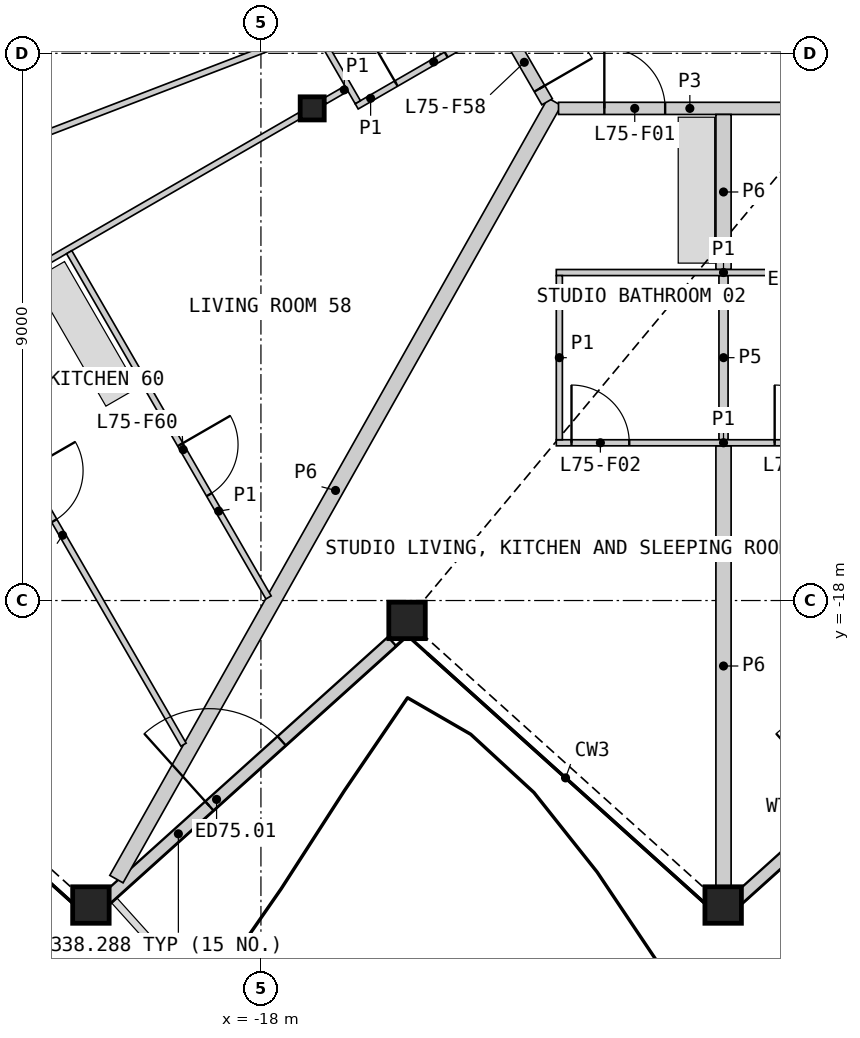
"""IFC4 building model, lengths in metres.
Left out: names, types, materials, properties, quantities, classifications, styles, units other than length and angle.
Written with IfcOpenShell. Run it as: python <this file> out.ifc"""

import sys

from ifc_helpers import new_model, si_unit, direction, frame, frame_2d, origin, origin_2d, place, context, subcontext, project, spatial, rectangle, hollow_rectangle, i_section, extrude, element, fill, save


model = new_model("IFC4")
c1 = context("Model", 3, precision=1e-05, world=origin(), true_north=direction((0.0, 1.0)))
c2 = subcontext(c1, "Body", "Model", "MODEL_VIEW")
j1 = project(units=[si_unit("LENGTHUNIT", "METRE"), si_unit("PLANEANGLEUNIT", "RADIAN")], contexts=[c1])
p1 = place(None, origin())
s1 = spatial("IfcSite", under=j1, at=p1, CompositionType="ELEMENT")
p2 = place(p1, origin())
s2 = spatial("IfcBuilding", under=s1, at=p2, CompositionType="ELEMENT")
p3 = place(p2, frame((0.0, 0.0, 335.8)))
s3 = spatial("IfcBuildingStorey", under=s2, at=p3, CompositionType="ELEMENT", Elevation=335.8)
for number, where, z_axis, x_axis in (
    (1, (-20.796, -23.008, 0.0), (0.0, 0.0, 1.0), (1.0, 0.0, 0.0)),
    (2, (-15.597, -18.327, 0.0), (0.0, 0.0, 1.0), (1.0, 0.0, 0.0)),
    (3, (-10.398, -23.008, 0.0), (0.0, 0.0, 1.0), (1.0, 0.0, 0.0)),
):
    element("IfcColumn", number, at=place(p3, frame(where, z_axis=z_axis, x_axis=x_axis)), inside=s3, PredefinedType="COLUMN", context=c2, shape_type="SweptSolid", body=[
        extrude(hollow_rectangle(XDim=0.6, YDim=0.6, WallThickness=0.04, at=origin_2d()), origin(), (0.0, 0.0, 1.0), 3.4),
    ])
p4 = place(p3, frame((-17.157, -9.906, 0.0), z_axis=(0.0, 0.0, 1.0), x_axis=(1.0, 0.0, 0.0)))
e4 = element("IfcColumn", 4, at=p4, inside=s3, PredefinedType="COLUMN", context=c2, shape_type="SweptSolid", body=[
    extrude(i_section(OverallWidth=0.396, OverallDepth=0.381, WebThickness=0.019, FlangeThickness=0.03, at=origin_2d()), origin(), (0.0, 0.0, 1.0), 3.4),
])
p5 = place(p3, frame((-20.53, -22.892, 0.0), z_axis=(0.0, 0.0, 1.0), x_axis=(0.743134328827, 0.669142263887, 0.0)))
e5 = element("IfcWall", 5, at=p5, inside=s3, PredefinedType="SOLIDWALL", context=c2, shape_type="SweptSolid", body=[
    extrude(rectangle(XDim=6.305, YDim=0.2, at=frame_2d((3.153, 0.0))), origin(), (0.0, 0.0, 1.0), 2.488),
])
p6 = place(p5, frame((2.262, 0.0, 0.0)))
e6 = element("IfcOpeningElement", 6, at=p6, cuts=e5, PredefinedType="OPENING", context=c2, shape_type="SweptSolid", body=[
    extrude(rectangle(XDim=1.6, YDim=2.25, at=frame_2d((0.8, 1.125))), frame((0.0, 0.11, 0.0), z_axis=(0.0, -1.0, 0.0), x_axis=(1.0, 0.0, 0.0)), (0.0, 0.0, 1.0), 0.22),
])
p7 = place(p3, frame((-10.137, -22.892, 0.0), z_axis=(0.0, 0.0, 1.0), x_axis=(0.743147981531, 0.669127101189, 0.0)))
e7 = element("IfcWall", 7, at=p7, inside=s3, PredefinedType="SOLIDWALL", context=c2, shape_type="SweptSolid", body=[
    extrude(rectangle(XDim=6.313, YDim=0.2, at=frame_2d((3.156, 0.0))), origin(), (0.0, 0.0, 1.0), 2.488),
])
p8 = place(p7, frame((2.262, 0.0, 0.0)))
e8 = element("IfcOpeningElement", 8, at=p8, cuts=e7, PredefinedType="OPENING", context=c2, shape_type="SweptSolid", body=[
    extrude(rectangle(XDim=1.6, YDim=2.25, at=frame_2d((0.8, 1.125))), frame((0.0, 0.11, 0.0), z_axis=(0.0, -1.0, 0.0), x_axis=(1.0, 0.0, 0.0)), (0.0, 0.0, 1.0), 0.22),
])
p9 = place(p3, frame((-20.376, -22.582, 0.0), z_axis=(0.0, 0.0, 1.0), x_axis=(0.491057132664, 0.871127368678, 0.0)))
e9 = element("IfcWall", 9, at=p9, inside=s3, PredefinedType="PARTITIONING", context=c2, shape_type="SweptSolid", body=[
    extrude(rectangle(XDim=14.677, YDim=0.25, at=frame_2d((7.338, 0.0))), origin(), (0.0, 0.0, 1.0), 2.33),
])
p10 = place(p3, frame((-10.393, -22.698, 0.0), z_axis=(0.0, 0.0, 1.0), x_axis=(0.0, 1.0, 0.0)))
e10 = element("IfcWall", 10, at=p10, inside=s3, PredefinedType="PARTITIONING", context=c2, shape_type="SweptSolid", body=[
    extrude(rectangle(XDim=7.242, YDim=0.25, at=frame_2d((3.621, 0.0))), origin(), (0.0, 0.0, 1.0), 2.33),
])
p11 = place(p3, frame((-13.106, -9.906, 0.0), z_axis=(0.0, 0.0, 1.0), x_axis=(1.0, 0.0, 0.0)))
e11 = element("IfcWall", 11, at=p11, inside=s3, PredefinedType="PARTITIONING", context=c2, shape_type="SweptSolid", body=[
    extrude(rectangle(XDim=4.32, YDim=0.2, at=frame_2d((2.16, 0.0))), origin(), (0.0, 0.0, 1.0), 3.1),
])
p12 = place(p11, frame((0.753, 0.0, 0.0)))
e12 = element("IfcOpeningElement", 12, at=p12, cuts=e11, PredefinedType="OPENING", context=c2, shape_type="SweptSolid", body=[
    extrude(rectangle(XDim=1.0, YDim=2.1, at=frame_2d((0.5, 1.05))), frame((0.0, 0.11, 0.0), z_axis=(0.0, -1.0, 0.0), x_axis=(1.0, 0.0, 0.0)), (0.0, 0.0, 1.0), 0.22),
])
p13 = place(p3, frame((-15.131, -6.614, 0.0), z_axis=(0.0, 0.0, 1.0), x_axis=(0.499967746641, -0.866044024469, 0.0)))
e13 = element("IfcWall", 13, at=p13, inside=s3, PredefinedType="PARTITIONING", context=c2, shape_type="SweptSolid", body=[
    extrude(rectangle(XDim=3.676, YDim=0.2, at=frame_2d((1.838, 0.0))), origin(), (0.0, 0.0, 1.0), 3.1),
])
p14 = place(p13, frame((2.426, 0.0, 0.0)))
e14 = element("IfcOpeningElement", 14, at=p14, cuts=e13, PredefinedType="OPENING", context=c2, shape_type="SweptSolid", body=[
    extrude(rectangle(XDim=1.0, YDim=2.1, at=frame_2d((0.5, 1.05))), frame((0.0, 0.11, 0.0), z_axis=(0.0, -1.0, 0.0), x_axis=(1.0, 0.0, 0.0)), (0.0, 0.0, 1.0), 0.22),
])
p15 = place(p3, frame((-10.393, -12.556, 0.0), z_axis=(0.0, 0.0, 1.0), x_axis=(0.0, 1.0, 0.0)))
e15 = element("IfcWall", 15, at=p15, inside=s3, PredefinedType="PARTITIONING", context=c2, shape_type="SweptSolid", body=[
    extrude(rectangle(XDim=2.55, YDim=0.25, at=frame_2d((1.275, 0.0))), origin(), (0.0, 0.0, 1.0), 2.33),
])
p16 = place(p3, frame((-10.393, -15.356, 0.0), z_axis=(0.0, 0.0, 1.0), x_axis=(0.0, 1.0, 0.0)))
e16 = element("IfcWall", 16, at=p16, inside=s3, PredefinedType="PLUMBINGWALL", context=c2, shape_type="SweptSolid", body=[
    extrude(rectangle(XDim=2.7, YDim=0.15, at=frame_2d((1.35, 0.0))), origin(), (0.0, 0.0, 1.0), 2.33),
])
p17 = place(p3, frame((-28.631, -13.039, 0.0), z_axis=(0.0, 0.0, 1.0), x_axis=(0.933581130309, 0.358366116048, 0.0)))
e17 = element("IfcWall", 17, at=p17, inside=s3, PredefinedType="PARTITIONING", context=c2, shape_type="SweptSolid", body=[
    extrude(rectangle(XDim=12.306, YDim=0.1, at=frame_2d((6.153, 0.0))), origin(), (0.0, 0.0, 1.0), 2.33),
])
p18 = place(p17, frame((5.276, 0.0, 0.0)))
e18 = element("IfcOpeningElement", 18, at=p18, cuts=e17, PredefinedType="OPENING", context=c2, shape_type="SweptSolid", body=[
    extrude(rectangle(XDim=0.95, YDim=2.1, at=frame_2d((0.475, 1.05))), frame((0.0, 0.06, 0.0), z_axis=(0.0, -1.0, 0.0), x_axis=(1.0, 0.0, 0.0)), (0.0, 0.0, 1.0), 0.12),
])
p19 = place(p3, frame((-27.122, -15.659, 0.0), z_axis=(0.0, 0.0, 1.0), x_axis=(0.866021046153, 0.500007547564, 0.0)))
e19 = element("IfcWall", 19, at=p19, inside=s3, PredefinedType="PARTITIONING", context=c2, shape_type="SweptSolid", body=[
    extrude(rectangle(XDim=11.267, YDim=0.1, at=frame_2d((5.634, 0.0))), origin(), (0.0, 0.0, 1.0), 2.33),
])
p20 = place(p19, frame((1.552, 0.0, 0.0)))
e20 = element("IfcOpeningElement", 20, at=p20, cuts=e19, PredefinedType="OPENING", context=c2, shape_type="SweptSolid", body=[
    extrude(rectangle(XDim=0.95, YDim=2.1, at=frame_2d((0.475, 1.05))), frame((0.0, 0.06, 0.0), z_axis=(0.0, -1.0, 0.0), x_axis=(1.0, 0.0, 0.0)), (0.0, 0.0, 1.0), 0.12),
])
p21 = place(p3, frame((-23.251, -13.482, 0.0), z_axis=(0.0, 0.0, 1.0), x_axis=(0.500017325895, -0.866015400443, 0.0)))
e21 = element("IfcWall", 21, at=p21, inside=s3, PredefinedType="PARTITIONING", context=c2, shape_type="SweptSolid", body=[
    extrude(rectangle(XDim=7.955, YDim=0.1, at=frame_2d((3.978, 0.0))), origin(), (0.0, 0.0, 1.0), 2.33),
])
p22 = place(p21, frame((2.752, 0.0, 0.0)))
e22 = element("IfcOpeningElement", 22, at=p22, cuts=e21, PredefinedType="OPENING", context=c2, shape_type="SweptSolid", body=[
    extrude(rectangle(XDim=0.95, YDim=2.1, at=frame_2d((0.475, 1.05))), frame((0.0, 0.06, 0.0), z_axis=(0.0, -1.0, 0.0), x_axis=(1.0, 0.0, 0.0)), (0.0, 0.0, 1.0), 0.12),
])
p23 = place(p3, frame((-21.154, -12.271, 0.0), z_axis=(0.0, 0.0, 1.0), x_axis=(0.500011451804, -0.866018791981, 0.0)))
e23 = element("IfcWall", 23, at=p23, inside=s3, PredefinedType="PARTITIONING", context=c2, shape_type="SweptSolid", body=[
    extrude(rectangle(XDim=6.557, YDim=0.1, at=frame_2d((3.278, 0.0))), origin(), (0.0, 0.0, 1.0), 2.33),
])
p24 = place(p23, frame((3.655, 0.0, 0.0)))
e24 = element("IfcOpeningElement", 24, at=p24, cuts=e23, PredefinedType="OPENING", context=c2, shape_type="SweptSolid", body=[
    extrude(rectangle(XDim=0.95, YDim=2.1, at=frame_2d((0.475, 1.05))), frame((0.0, 0.06, 0.0), z_axis=(0.0, -1.0, 0.0), x_axis=(1.0, 0.0, 0.0)), (0.0, 0.0, 1.0), 0.12),
])
p25 = place(p3, frame((-13.143, -12.606, 0.0), z_axis=(0.0, 0.0, 1.0), x_axis=(1.0, 0.0, 0.0)))
e25 = element("IfcWall", 25, at=p25, inside=s3, PredefinedType="PARTITIONING", context=c2, shape_type="SweptSolid", body=[
    extrude(rectangle(XDim=5.5, YDim=0.1, at=frame_2d((2.75, 0.0))), origin(), (0.0, 0.0, 1.0), 2.33),
])
p26 = place(p3, frame((-13.143, -15.406, 0.0), z_axis=(0.0, 0.0, 1.0), x_axis=(1.0, 0.0, 0.0)))
e26 = element("IfcWall", 26, at=p26, inside=s3, PredefinedType="PARTITIONING", context=c2, shape_type="SweptSolid", body=[
    extrude(rectangle(XDim=5.5, YDim=0.1, at=frame_2d((2.75, 0.0))), origin(), (0.0, 0.0, 1.0), 2.33),
])
p27 = place(p26, frame((0.25, 0.0, 0.0)))
e27 = element("IfcOpeningElement", 27, at=p27, cuts=e26, PredefinedType="OPENING", context=c2, shape_type="SweptSolid", body=[
    extrude(rectangle(XDim=0.95, YDim=2.1, at=frame_2d((0.475, 1.05))), frame((0.0, 0.06, 0.0), z_axis=(0.0, -1.0, 0.0), x_axis=(1.0, 0.0, 0.0)), (0.0, 0.0, 1.0), 0.12),
])
p28 = place(p26, frame((3.591, 0.0, 0.0)))
e28 = element("IfcOpeningElement", 28, at=p28, cuts=e26, PredefinedType="OPENING", context=c2, shape_type="SweptSolid", body=[
    extrude(rectangle(XDim=0.95, YDim=2.1, at=frame_2d((0.475, 1.05))), frame((0.0, 0.06, 0.0), z_axis=(0.0, -1.0, 0.0), x_axis=(1.0, 0.0, 0.0)), (0.0, 0.0, 1.0), 0.12),
])
p29 = place(p3, frame((-13.093, -15.356, 0.0), z_axis=(0.0, 0.0, 1.0), x_axis=(0.0, 1.0, 0.0)))
e29 = element("IfcWall", 29, at=p29, inside=s3, PredefinedType="PARTITIONING", context=c2, shape_type="SweptSolid", body=[
    extrude(rectangle(XDim=2.7, YDim=0.1, at=frame_2d((1.35, 0.0))), origin(), (0.0, 0.0, 1.0), 2.33),
])
p30 = place(p3, frame((-16.426, -9.872, 0.0), z_axis=(0.0, 0.0, 1.0), x_axis=(0.866029095148, 0.499993606316, 0.0)))
e30 = element("IfcWall", 30, at=p30, inside=s3, PredefinedType="PARTITIONING", context=c2, shape_type="SweptSolid", body=[
    extrude(rectangle(XDim=2.65, YDim=0.1, at=frame_2d((1.325, 0.0))), origin(), (0.0, 0.0, 1.0), 2.33),
])
p31 = place(p30, frame((0.75, 0.0, 0.0)))
e31 = element("IfcOpeningElement", 31, at=p31, cuts=e30, PredefinedType="OPENING", context=c2, shape_type="SweptSolid", body=[
    extrude(rectangle(XDim=0.95, YDim=2.1, at=frame_2d((0.475, 1.05))), frame((0.0, 0.06, 0.0), z_axis=(0.0, -1.0, 0.0), x_axis=(1.0, 0.0, 0.0)), (0.0, 0.0, 1.0), 0.12),
])
p32 = place(p3, frame((-17.507, -7.899, 0.0), z_axis=(0.0, 0.0, 1.0), x_axis=(0.499946605688, -0.86605622881, 0.0)))
e32 = element("IfcWall", 32, at=p32, inside=s3, PredefinedType="PARTITIONING", context=c2, shape_type="SweptSolid", body=[
    extrude(rectangle(XDim=2.2, YDim=0.1, at=frame_2d((1.1, 0.0))), origin(), (0.0, 0.0, 1.0), 2.33),
])
p33 = place(p3, frame((-16.949, -9.786, 0.0), z_axis=(0.0, 0.0, 1.0), x_axis=(0.866036909293, 0.499980071345, 0.0)))
e33 = element("IfcWall", 33, at=p33, inside=s3, PredefinedType="PARTITIONING", context=c2, shape_type="SweptSolid", body=[
    extrude(rectangle(XDim=0.41, YDim=0.1, at=frame_2d((0.205, 0.0))), origin(), (0.0, 0.0, 1.0), 2.33),
])
p34 = place(p6, origin())
e34 = element("IfcDoor", 34, at=p34, inside=s3, OperationType="DOUBLE_DOOR_SINGLE_SWING", PredefinedType="DOOR", context=c2, shape_type="SweptSolid", body=[
    extrude(rectangle(XDim=1.6, YDim=2.25, at=frame_2d((0.8, 1.125))), frame((0.0, 0.025, 0.0), z_axis=(0.0, -1.0, 0.0), x_axis=(1.0, 0.0, 0.0)), (0.0, 0.0, 1.0), 0.05),
])
fill(e6, e34)
p35 = place(p12, origin())
e35 = element("IfcDoor", 35, at=p35, inside=s3, OperationType="SINGLE_SWING_LEFT", PredefinedType="DOOR", context=c2, shape_type="SweptSolid", body=[
    extrude(rectangle(XDim=1.0, YDim=2.1, at=frame_2d((0.5, 1.05))), frame((0.0, 0.025, 0.0), z_axis=(0.0, -1.0, 0.0), x_axis=(1.0, 0.0, 0.0)), (0.0, 0.0, 1.0), 0.05),
])
fill(e12, e35)
p36 = place(p27, origin())
e36 = element("IfcDoor", 36, at=p36, inside=s3, OperationType="SINGLE_SWING_LEFT", PredefinedType="DOOR", context=c2, shape_type="SweptSolid", body=[
    extrude(rectangle(XDim=0.95, YDim=2.1, at=frame_2d((0.475, 1.05))), frame((0.0, 0.025, 0.0), z_axis=(0.0, -1.0, 0.0), x_axis=(1.0, 0.0, 0.0)), (0.0, 0.0, 1.0), 0.05),
])
fill(e27, e36)
p37 = place(p28, origin())
e37 = element("IfcDoor", 37, at=p37, inside=s3, OperationType="SINGLE_SWING_LEFT", PredefinedType="DOOR", context=c2, shape_type="SweptSolid", body=[
    extrude(rectangle(XDim=0.95, YDim=2.1, at=frame_2d((0.475, 1.05))), frame((0.0, 0.025, 0.0), z_axis=(0.0, -1.0, 0.0), x_axis=(1.0, 0.0, 0.0)), (0.0, 0.0, 1.0), 0.05),
])
fill(e28, e37)
p38 = place(p14, origin())
e38 = element("IfcDoor", 38, at=p38, inside=s3, OperationType="SINGLE_SWING_RIGHT", PredefinedType="DOOR", context=c2, shape_type="SweptSolid", body=[
    extrude(rectangle(XDim=1.0, YDim=2.1, at=frame_2d((0.5, 1.05))), frame((0.0, 0.025, 0.0), z_axis=(0.0, -1.0, 0.0), x_axis=(1.0, 0.0, 0.0)), (0.0, 0.0, 1.0), 0.05),
])
fill(e14, e38)
p39 = place(p31, origin())
e39 = element("IfcDoor", 39, at=p39, inside=s3, OperationType="SINGLE_SWING_LEFT", PredefinedType="DOOR", context=c2, shape_type="SweptSolid", body=[
    extrude(rectangle(XDim=0.95, YDim=2.1, at=frame_2d((0.475, 1.05))), frame((0.0, 0.025, 0.0), z_axis=(0.0, -1.0, 0.0), x_axis=(1.0, 0.0, 0.0)), (0.0, 0.0, 1.0), 0.05),
])
fill(e31, e39)
p40 = place(p24, origin())
e40 = element("IfcDoor", 40, at=p40, inside=s3, OperationType="SINGLE_SWING_LEFT", PredefinedType="DOOR", context=c2, shape_type="SweptSolid", body=[
    extrude(rectangle(XDim=0.95, YDim=2.1, at=frame_2d((0.475, 1.05))), frame((0.0, 0.025, 0.0), z_axis=(0.0, -1.0, 0.0), x_axis=(1.0, 0.0, 0.0)), (0.0, 0.0, 1.0), 0.05),
])
fill(e24, e40)
p41 = place(p22, origin())
e41 = element("IfcDoor", 41, at=p41, inside=s3, OperationType="SINGLE_SWING_LEFT", PredefinedType="DOOR", context=c2, shape_type="SweptSolid", body=[
    extrude(rectangle(XDim=0.95, YDim=2.1, at=frame_2d((0.475, 1.05))), frame((0.0, 0.025, 0.0), z_axis=(0.0, -1.0, 0.0), x_axis=(1.0, 0.0, 0.0)), (0.0, 0.0, 1.0), 0.05),
])
fill(e22, e41)
save(model, sys.argv[1])
